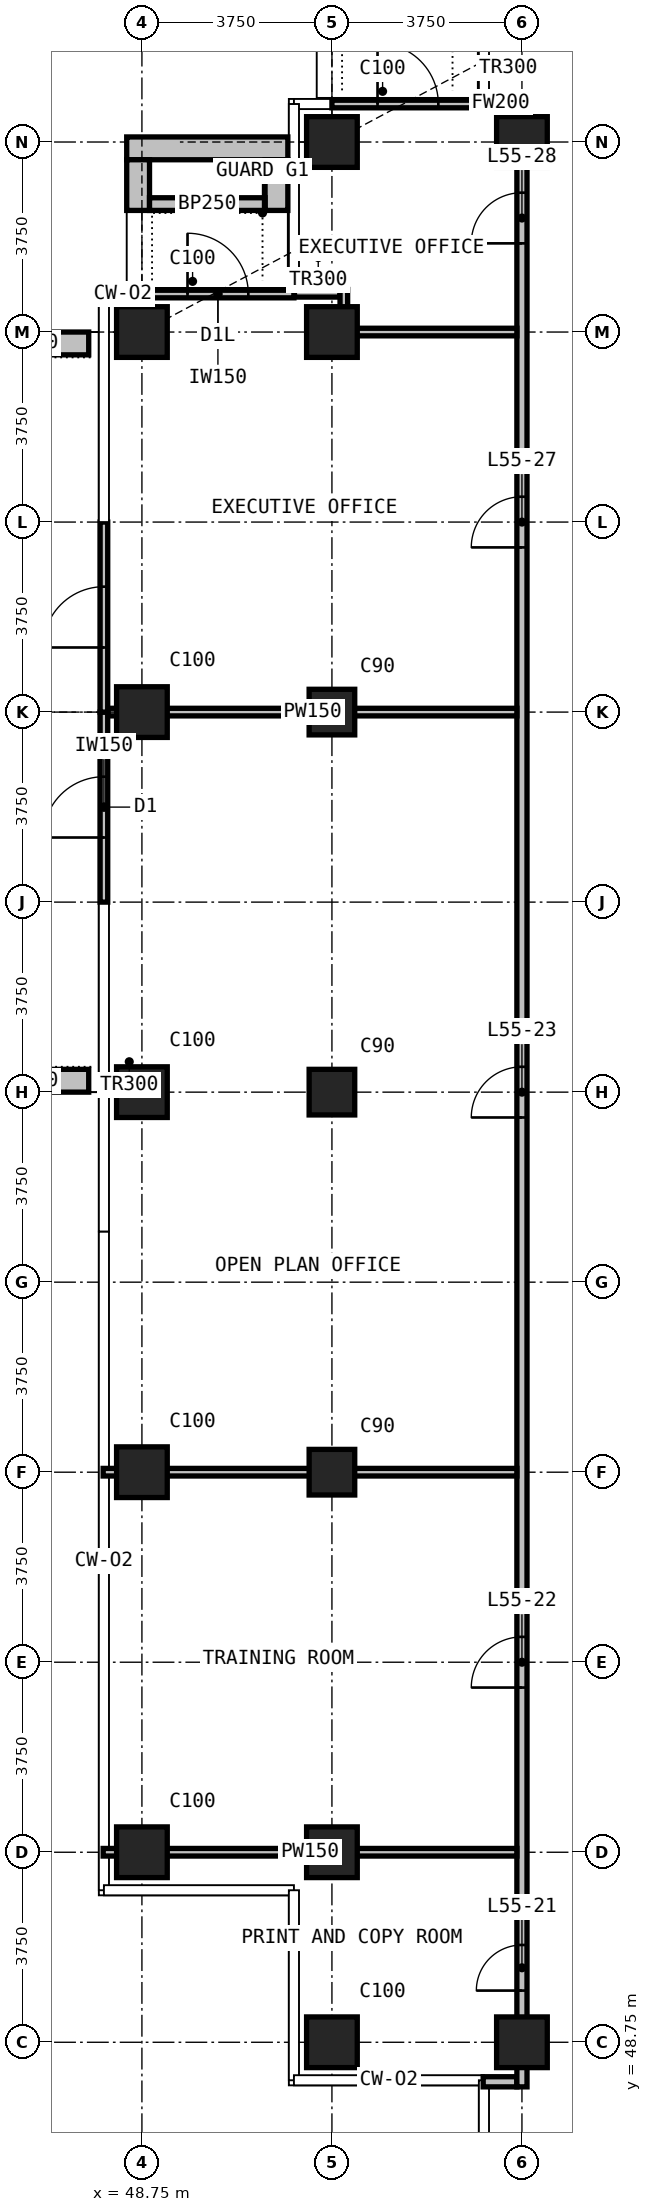
"""IFC4 building model, lengths in metres.
Left out: names, types, materials, properties, quantities, classifications, styles, units other than length and angle.
Written with IfcOpenShell. Run it as: python <this file> out.ifc"""

import sys

from ifc_helpers import new_model, si_unit, direction, frame, frame_2d, origin, origin_2d, place, context, subcontext, project, spatial, rectangle, extrude, element, fill, save


model = new_model("IFC4")
c1 = context("Model", 3, precision=1e-05, world=origin(), true_north=direction((0.0, 1.0)))
c2 = subcontext(c1, "Body", "Model", "MODEL_VIEW")
j1 = project(units=[si_unit("LENGTHUNIT", "METRE"), si_unit("PLANEANGLEUNIT", "RADIAN")], contexts=[c1])
p1 = place(None, origin())
s1 = spatial("IfcSite", under=j1, at=p1, CompositionType="ELEMENT")
p2 = place(p1, origin())
s2 = spatial("IfcBuilding", under=s1, at=p2, CompositionType="ELEMENT")
p3 = place(p2, frame((0.0, 0.0, 213.9)))
s3 = spatial("IfcBuildingStorey", under=s2, at=p3, CompositionType="ELEMENT", Elevation=213.9)
for number, where, z_axis, x_axis in (
    (1, (48.75, 52.5, 0.0), (0.0, 0.0, 1.0), (1.0, 0.0, 0.0)),
    (2, (48.75, 60.0, 0.0), (0.0, 0.0, 1.0), (1.0, 0.0, 0.0)),
    (3, (48.75, 67.5, 0.0), (0.0, 0.0, 1.0), (1.0, 0.0, 0.0)),
    (4, (48.75, 75.0, 0.0), (0.0, 0.0, 1.0), (1.0, 0.0, 0.0)),
    (5, (48.75, 82.5, 0.0), (0.0, 0.0, 1.0), (1.0, 0.0, 0.0)),
    (6, (52.5, 48.75, 0.0), (0.0, 0.0, 1.0), (1.0, 0.0, 0.0)),
    (7, (52.5, 52.5, 0.0), (0.0, 0.0, 1.0), (1.0, 0.0, 0.0)),
):
    element("IfcColumn", number, at=place(p3, frame(where, z_axis=z_axis, x_axis=x_axis)), inside=s3, PredefinedType="COLUMN", context=c2, shape_type="SweptSolid", body=[
        extrude(rectangle(XDim=1.0, YDim=1.0, at=origin_2d()), origin(), (0.0, 0.0, 1.0), 3.6),
    ])
for number, where, z_axis, x_axis in (
    (8, (52.5, 60.0, 0.0), (0.0, 0.0, 1.0), (1.0, 0.0, 0.0)),
    (9, (52.5, 67.5, 0.0), (0.0, 0.0, 1.0), (1.0, 0.0, 0.0)),
    (10, (52.5, 75.0, 0.0), (0.0, 0.0, 1.0), (1.0, 0.0, 0.0)),
):
    element("IfcColumn", number, at=place(p3, frame(where, z_axis=z_axis, x_axis=x_axis)), inside=s3, PredefinedType="COLUMN", context=c2, shape_type="SweptSolid", body=[
        extrude(rectangle(XDim=0.9, YDim=0.9, at=origin_2d()), origin(), (0.0, 0.0, 1.0), 3.6),
    ])
for number, where, z_axis, x_axis in (
    (11, (52.5, 82.5, 0.0), (0.0, 0.0, 1.0), (1.0, 0.0, 0.0)),
    (12, (52.5, 86.25, 0.0), (0.0, 0.0, 1.0), (1.0, 0.0, 0.0)),
    (13, (56.25, 48.75, 0.0), (0.0, 0.0, 1.0), (1.0, 0.0, 0.0)),
    (14, (56.25, 86.25, 0.0), (0.0, 0.0, 1.0), (1.0, 0.0, 0.0)),
):
    element("IfcColumn", number, at=place(p3, frame(where, z_axis=z_axis, x_axis=x_axis)), inside=s3, PredefinedType="COLUMN", context=c2, shape_type="SweptSolid", body=[
        extrude(rectangle(XDim=1.0, YDim=1.0, at=origin_2d()), origin(), (0.0, 0.0, 1.0), 3.6),
    ])
p4 = place(p3, frame((52.5, 87.0, 0.0), z_axis=(0.0, 0.0, 1.0), x_axis=(1.0, 0.0, 0.0)))
e15 = element("IfcWall", 15, at=p4, inside=s3, PredefinedType="SOLIDWALL", context=c2, shape_type="SweptSolid", body=[
    extrude(rectangle(XDim=3.0, YDim=0.15, at=frame_2d((1.5, 0.0))), origin(), (0.0, 0.0, 1.0), 3.3),
])
p5 = place(p4, frame((0.9, 0.0, 0.0)))
e16 = element("IfcOpeningElement", 16, at=p5, cuts=e15, PredefinedType="OPENING", context=c2, shape_type="SweptSolid", body=[
    extrude(rectangle(XDim=1.2, YDim=2.0, at=frame_2d((0.6, 1.0))), frame((0.0, 0.085, 0.0), z_axis=(0.0, -1.0, 0.0), x_axis=(1.0, 0.0, 0.0)), (0.0, 0.0, 1.0), 0.17),
])
p6 = place(p3, frame((48.75, 83.25, 0.0), z_axis=(0.0, 0.0, 1.0), x_axis=(1.0, 0.0, 0.0)))
e17 = element("IfcWall", 17, at=p6, inside=s3, PredefinedType="SOLIDWALL", context=c2, shape_type="SweptSolid", body=[
    extrude(rectangle(XDim=3.0, YDim=0.15, at=frame_2d((1.5, 0.0))), origin(), (0.0, 0.0, 1.0), 3.3),
])
p7 = place(p6, frame((0.9, 0.0, 0.0)))
e18 = element("IfcOpeningElement", 18, at=p7, cuts=e17, PredefinedType="OPENING", context=c2, shape_type="SweptSolid", body=[
    extrude(rectangle(XDim=1.2, YDim=2.0, at=frame_2d((0.6, 1.0))), frame((0.0, 0.085, 0.0), z_axis=(0.0, -1.0, 0.0), x_axis=(1.0, 0.0, 0.0)), (0.0, 0.0, 1.0), 0.17),
])
p8 = place(p3, frame((48.0, 71.25, 0.0), z_axis=(0.0, 0.0, 1.0), x_axis=(0.0, 1.0, 0.0)))
e19 = element("IfcWall", 19, at=p8, inside=s3, PredefinedType="SOLIDWALL", context=c2, shape_type="SweptSolid", body=[
    extrude(rectangle(XDim=3.75, YDim=0.15, at=frame_2d((1.875, 0.0))), origin(), (0.0, 0.0, 1.0), 3.3),
])
p9 = place(p8, frame((1.275, 0.0, 0.0)))
e20 = element("IfcOpeningElement", 20, at=p9, cuts=e19, PredefinedType="OPENING", context=c2, shape_type="SweptSolid", body=[
    extrude(rectangle(XDim=1.2, YDim=2.4, at=frame_2d((0.6, 1.2))), frame((0.0, 0.085, 0.0), z_axis=(0.0, -1.0, 0.0), x_axis=(1.0, 0.0, 0.0)), (0.0, 0.0, 1.0), 0.17),
])
p10 = place(p3, frame((48.0, 75.0, 0.0), z_axis=(0.0, 0.0, 1.0), x_axis=(0.0, 1.0, 0.0)))
e21 = element("IfcWall", 21, at=p10, inside=s3, PredefinedType="SOLIDWALL", context=c2, shape_type="SweptSolid", body=[
    extrude(rectangle(XDim=3.75, YDim=0.15, at=frame_2d((1.875, 0.0))), origin(), (0.0, 0.0, 1.0), 3.3),
])
p11 = place(p10, frame((1.275, 0.0, 0.0)))
e22 = element("IfcOpeningElement", 22, at=p11, cuts=e21, PredefinedType="OPENING", context=c2, shape_type="SweptSolid", body=[
    extrude(rectangle(XDim=1.2, YDim=2.4, at=frame_2d((0.6, 1.2))), frame((0.0, 0.085, 0.0), z_axis=(0.0, -1.0, 0.0), x_axis=(1.0, 0.0, 0.0)), (0.0, 0.0, 1.0), 0.17),
])
p12 = place(p3, frame((48.45, 86.125, 0.0), z_axis=(0.0, 0.0, 1.0), x_axis=(1.0, 0.0, 0.0)))
e23 = element("IfcWall", 23, at=p12, inside=s3, PredefinedType="USERDEFINED", context=c2, shape_type="SweptSolid", body=[
    extrude(rectangle(XDim=3.18, YDim=0.45, at=frame_2d((1.59, 0.0))), origin(), (0.0, 0.0, 1.0), 1.1),
])
for number, where, z_axis, x_axis in (
    (24, (48.675, 84.9, 0.0), (0.0, 0.0, 1.0), (0.0, 1.0, 0.0)),
    (25, (51.405, 84.9, 0.0), (0.0, 0.0, 1.0), (0.0, 1.0, 0.0)),
):
    element("IfcWall", number, at=place(p3, frame(where, z_axis=z_axis, x_axis=x_axis)), inside=s3, PredefinedType="USERDEFINED", context=c2, shape_type="SweptSolid", body=[
        extrude(rectangle(XDim=1.0, YDim=0.45, at=frame_2d((0.5, 0.0))), origin(), (0.0, 0.0, 1.0), 1.1),
    ])
p13 = place(p3, frame((48.9, 85.025, 0.0), z_axis=(0.0, 0.0, 1.0), x_axis=(1.0, 0.0, 0.0)))
e26 = element("IfcWall", 26, at=p13, inside=s3, PredefinedType="USERDEFINED", context=c2, shape_type="SweptSolid", body=[
    extrude(rectangle(XDim=2.28, YDim=0.25, at=frame_2d((1.14, 0.0))), origin(), (0.0, 0.0, 1.0), 1.0),
])
for number, where, z_axis, x_axis in (
    (27, (47.7, 67.725, 0.0), (0.0, 0.0, 1.0), (-1.0, 0.0, 0.0)),
    (28, (47.7, 82.275, 0.0), (0.0, 0.0, 1.0), (-1.0, 0.0, 0.0)),
):
    element("IfcWall", number, at=place(p3, frame(where, z_axis=z_axis, x_axis=x_axis)), inside=s3, PredefinedType="USERDEFINED", context=c2, shape_type="SweptSolid", body=[
        extrude(rectangle(XDim=2.35, YDim=0.45, at=frame_2d((1.175, 0.0))), origin(), (0.0, 0.0, 1.0), 1.1),
    ])
p14 = place(p3, frame((55.485, 47.97, 0.0), z_axis=(0.0, 0.0, 1.0), x_axis=(1.0, 0.0, 0.0)))
e29 = element("IfcWall", 29, at=p14, inside=s3, PredefinedType="PARTITIONING", context=c2, shape_type="SweptSolid", body=[
    extrude(rectangle(XDim=0.665, YDim=0.2, at=frame_2d((0.333, 0.0))), origin(), (0.0, 0.0, 1.0), 3.3),
])
p15 = place(p3, frame((55.51, 87.03, 0.0), z_axis=(0.0, 0.0, 1.0), x_axis=(1.0, 0.0, 0.0)))
e30 = element("IfcWall", 30, at=p15, inside=s3, PredefinedType="PARTITIONING", context=c2, shape_type="SweptSolid", body=[
    extrude(rectangle(XDim=0.64, YDim=0.2, at=frame_2d((0.32, 0.0))), origin(), (0.0, 0.0, 1.0), 3.3),
])
p16 = place(p3, frame((56.25, 47.87, 0.0), z_axis=(0.0, 0.0, 1.0), x_axis=(0.0, 1.0, 0.0)))
e31 = element("IfcWall", 31, at=p16, inside=s3, PredefinedType="PARTITIONING", context=c2, shape_type="SweptSolid", body=[
    extrude(rectangle(XDim=39.26, YDim=0.2, at=frame_2d((19.63, 0.0))), origin(), (0.0, 0.0, 1.0), 3.3),
])
p17 = place(p16, frame((1.9, 0.0, 0.0)))
e32 = element("IfcOpeningElement", 32, at=p17, cuts=e31, PredefinedType="OPENING", context=c2, shape_type="SweptSolid", body=[
    extrude(rectangle(XDim=0.9, YDim=2.2, at=frame_2d((0.45, 1.1))), frame((0.0, 0.11, 0.0), z_axis=(0.0, -1.0, 0.0), x_axis=(1.0, 0.0, 0.0)), (0.0, 0.0, 1.0), 0.22),
])
p18 = place(p16, frame((7.88, 0.0, 0.0)))
e33 = element("IfcOpeningElement", 33, at=p18, cuts=e31, PredefinedType="OPENING", context=c2, shape_type="SweptSolid", body=[
    extrude(rectangle(XDim=1.0, YDim=2.2, at=frame_2d((0.5, 1.1))), frame((0.0, 0.11, 0.0), z_axis=(0.0, -1.0, 0.0), x_axis=(1.0, 0.0, 0.0)), (0.0, 0.0, 1.0), 0.22),
])
p19 = place(p16, frame((19.13, 0.0, 0.0)))
e34 = element("IfcOpeningElement", 34, at=p19, cuts=e31, PredefinedType="OPENING", context=c2, shape_type="SweptSolid", body=[
    extrude(rectangle(XDim=1.0, YDim=2.2, at=frame_2d((0.5, 1.1))), frame((0.0, 0.11, 0.0), z_axis=(0.0, -1.0, 0.0), x_axis=(1.0, 0.0, 0.0)), (0.0, 0.0, 1.0), 0.22),
])
p20 = place(p16, frame((30.38, 0.0, 0.0)))
e35 = element("IfcOpeningElement", 35, at=p20, cuts=e31, PredefinedType="OPENING", context=c2, shape_type="SweptSolid", body=[
    extrude(rectangle(XDim=1.0, YDim=2.2, at=frame_2d((0.5, 1.1))), frame((0.0, 0.11, 0.0), z_axis=(0.0, -1.0, 0.0), x_axis=(1.0, 0.0, 0.0)), (0.0, 0.0, 1.0), 0.22),
])
p21 = place(p16, frame((36.38, 0.0, 0.0)))
e36 = element("IfcOpeningElement", 36, at=p21, cuts=e31, PredefinedType="OPENING", context=c2, shape_type="SweptSolid", body=[
    extrude(rectangle(XDim=1.0, YDim=2.2, at=frame_2d((0.5, 1.1))), frame((0.0, 0.11, 0.0), z_axis=(0.0, -1.0, 0.0), x_axis=(1.0, 0.0, 0.0)), (0.0, 0.0, 1.0), 0.22),
])
for number, where, z_axis, x_axis in (
    (37, (47.985, 52.5, 0.0), (0.0, 0.0, 1.0), (1.0, 0.0, 0.0)),
    (38, (47.985, 60.0, 0.0), (0.0, 0.0, 1.0), (1.0, 0.0, 0.0)),
):
    element("IfcWall", number, at=place(p3, frame(where, z_axis=z_axis, x_axis=x_axis)), inside=s3, PredefinedType="PARTITIONING", context=c2, shape_type="SweptSolid", body=[
        extrude(rectangle(XDim=8.165, YDim=0.15, at=frame_2d((4.083, 0.0))), origin(), (0.0, 0.0, 1.0), 3.3),
    ])
p22 = place(p3, frame((48.085, 75.0, 0.0), z_axis=(0.0, 0.0, 1.0), x_axis=(1.0, 0.0, 0.0)))
e39 = element("IfcWall", 39, at=p22, inside=s3, PredefinedType="PARTITIONING", context=c2, shape_type="SweptSolid", body=[
    extrude(rectangle(XDim=8.065, YDim=0.15, at=frame_2d((4.032, 0.0))), origin(), (0.0, 0.0, 1.0), 3.3),
])
p23 = place(p3, frame((52.81, 82.5, 0.0), z_axis=(0.0, 0.0, 1.0), x_axis=(1.0, 0.0, 0.0)))
e40 = element("IfcWall", 40, at=p23, inside=s3, PredefinedType="PARTITIONING", context=c2, shape_type="SweptSolid", body=[
    extrude(rectangle(XDim=3.34, YDim=0.15, at=frame_2d((1.67, 0.0))), origin(), (0.0, 0.0, 1.0), 3.3),
])
p24 = place(p3, frame((51.76, 83.265, 0.0), z_axis=(0.0, 0.0, 1.0), x_axis=(1.0, 0.0, 0.0)))
e41 = element("IfcWall", 41, at=p24, inside=s3, PredefinedType="PARTITIONING", context=c2, shape_type="SweptSolid", body=[
    extrude(rectangle(XDim=0.9, YDim=0.15, at=frame_2d((0.45, 0.0))), origin(), (0.0, 0.0, 1.0), 3.3),
])
p25 = place(p3, frame((52.735, 82.425, 0.0), z_axis=(0.0, 0.0, 1.0), x_axis=(0.0, 1.0, 0.0)))
e42 = element("IfcWall", 42, at=p25, inside=s3, PredefinedType="PARTITIONING", context=c2, shape_type="SweptSolid", body=[
    extrude(rectangle(XDim=0.915, YDim=0.15, at=frame_2d((0.458, 0.0))), origin(), (0.0, 0.0, 1.0), 3.3),
])
p26 = place(p5, origin())
e43 = element("IfcDoor", 43, at=p26, inside=s3, OperationType="SINGLE_SWING_LEFT", PredefinedType="DOOR", context=c2, shape_type="SweptSolid", body=[
    extrude(rectangle(XDim=1.2, YDim=2.0, at=frame_2d((0.6, 1.0))), frame((0.0, 0.025, 0.0), z_axis=(0.0, -1.0, 0.0), x_axis=(1.0, 0.0, 0.0)), (0.0, 0.0, 1.0), 0.05),
])
fill(e16, e43)
p27 = place(p7, origin())
e44 = element("IfcDoor", 44, at=p27, inside=s3, OperationType="SINGLE_SWING_LEFT", PredefinedType="DOOR", context=c2, shape_type="SweptSolid", body=[
    extrude(rectangle(XDim=1.2, YDim=2.0, at=frame_2d((0.6, 1.0))), frame((0.0, 0.025, 0.0), z_axis=(0.0, -1.0, 0.0), x_axis=(1.0, 0.0, 0.0)), (0.0, 0.0, 1.0), 0.05),
])
fill(e18, e44)
p28 = place(p9, origin())
e45 = element("IfcDoor", 45, at=p28, inside=s3, OperationType="SINGLE_SWING_LEFT", PredefinedType="DOOR", context=c2, shape_type="SweptSolid", body=[
    extrude(rectangle(XDim=1.2, YDim=2.4, at=frame_2d((0.6, 1.2))), frame((0.0, 0.025, 0.0), z_axis=(0.0, -1.0, 0.0), x_axis=(1.0, 0.0, 0.0)), (0.0, 0.0, 1.0), 0.05),
])
fill(e20, e45)
p29 = place(p11, origin())
e46 = element("IfcDoor", 46, at=p29, inside=s3, OperationType="SINGLE_SWING_LEFT", PredefinedType="DOOR", context=c2, shape_type="SweptSolid", body=[
    extrude(rectangle(XDim=1.2, YDim=2.4, at=frame_2d((0.6, 1.2))), frame((0.0, 0.025, 0.0), z_axis=(0.0, -1.0, 0.0), x_axis=(1.0, 0.0, 0.0)), (0.0, 0.0, 1.0), 0.05),
])
fill(e22, e46)
p30 = place(p17, origin())
e47 = element("IfcDoor", 47, at=p30, inside=s3, OperationType="SINGLE_SWING_LEFT", PredefinedType="DOOR", context=c2, shape_type="SweptSolid", body=[
    extrude(rectangle(XDim=0.9, YDim=2.2, at=frame_2d((0.45, 1.1))), frame((0.0, 0.025, 0.0), z_axis=(0.0, -1.0, 0.0), x_axis=(1.0, 0.0, 0.0)), (0.0, 0.0, 1.0), 0.05),
])
fill(e32, e47)
p31 = place(p18, origin())
e48 = element("IfcDoor", 48, at=p31, inside=s3, OperationType="SINGLE_SWING_LEFT", PredefinedType="DOOR", context=c2, shape_type="SweptSolid", body=[
    extrude(rectangle(XDim=1.0, YDim=2.2, at=frame_2d((0.5, 1.1))), frame((0.0, 0.025, 0.0), z_axis=(0.0, -1.0, 0.0), x_axis=(1.0, 0.0, 0.0)), (0.0, 0.0, 1.0), 0.05),
])
fill(e33, e48)
p32 = place(p19, origin())
e49 = element("IfcDoor", 49, at=p32, inside=s3, OperationType="SINGLE_SWING_LEFT", PredefinedType="DOOR", context=c2, shape_type="SweptSolid", body=[
    extrude(rectangle(XDim=1.0, YDim=2.2, at=frame_2d((0.5, 1.1))), frame((0.0, 0.025, 0.0), z_axis=(0.0, -1.0, 0.0), x_axis=(1.0, 0.0, 0.0)), (0.0, 0.0, 1.0), 0.05),
])
fill(e34, e49)
p33 = place(p20, origin())
e50 = element("IfcDoor", 50, at=p33, inside=s3, OperationType="SINGLE_SWING_RIGHT", PredefinedType="DOOR", context=c2, shape_type="SweptSolid", body=[
    extrude(rectangle(XDim=1.0, YDim=2.2, at=frame_2d((0.5, 1.1))), frame((0.0, 0.025, 0.0), z_axis=(0.0, -1.0, 0.0), x_axis=(1.0, 0.0, 0.0)), (0.0, 0.0, 1.0), 0.05),
])
fill(e35, e50)
p34 = place(p21, origin())
e51 = element("IfcDoor", 51, at=p34, inside=s3, OperationType="SINGLE_SWING_RIGHT", PredefinedType="DOOR", context=c2, shape_type="SweptSolid", body=[
    extrude(rectangle(XDim=1.0, YDim=2.2, at=frame_2d((0.5, 1.1))), frame((0.0, 0.025, 0.0), z_axis=(0.0, -1.0, 0.0), x_axis=(1.0, 0.0, 0.0)), (0.0, 0.0, 1.0), 0.05),
])
fill(e36, e51)
save(model, sys.argv[1])
